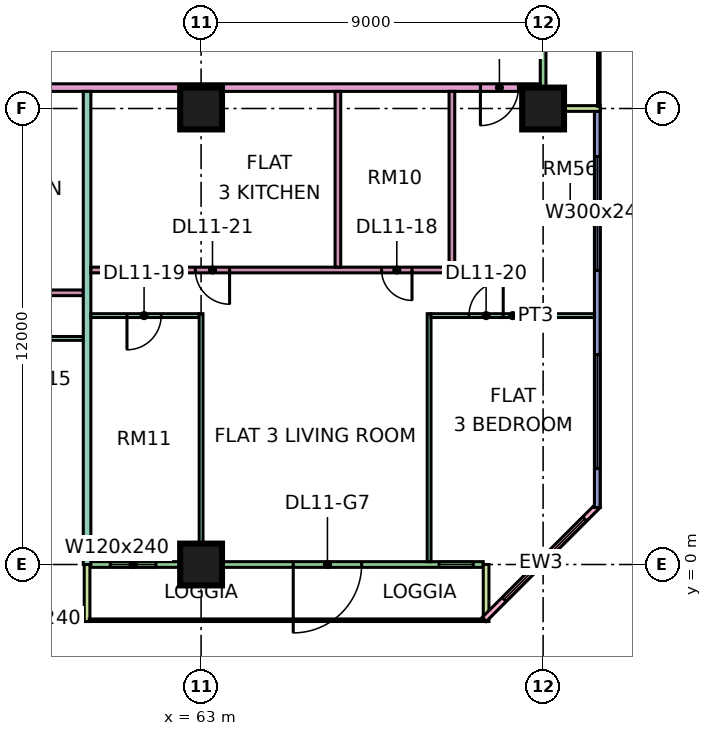
"""IFC4 building model, lengths in metres.
Left out: names, types, materials, properties, quantities, classifications, styles, units other than length and angle.
Written with IfcOpenShell. Run it as: python <this file> out.ifc"""

import sys

from ifc_helpers import new_model, si_unit, direction, frame, frame_2d, origin, origin_2d, place, context, subcontext, project, spatial, rectangle, extrude, element, fill, save


model = new_model("IFC4")
c1 = context("Model", 3, precision=1e-05, world=origin(), true_north=direction((0.0, 1.0)))
c2 = subcontext(c1, "Body", "Model", "MODEL_VIEW")
j1 = project(units=[si_unit("LENGTHUNIT", "METRE"), si_unit("PLANEANGLEUNIT", "RADIAN")], contexts=[c1])
p1 = place(None, origin())
s1 = spatial("IfcSite", under=j1, at=p1, CompositionType="ELEMENT")
p2 = place(p1, origin())
s2 = spatial("IfcBuilding", under=s1, at=p2, CompositionType="ELEMENT")
p3 = place(p2, frame((0.0, 0.0, 56.4)))
s3 = spatial("IfcBuildingStorey", under=s2, at=p3, CompositionType="ELEMENT", Elevation=56.4)
for number, where, z_axis, x_axis in (
    (1, (63.0, 0.0, 0.0), (0.0, 0.0, 1.0), (1.0, 0.0, 0.0)),
    (2, (63.0, 12.0, 0.0), (0.0, 0.0, 1.0), (1.0, 0.0, 0.0)),
    (3, (72.0, 12.0, 0.0), (0.0, 0.0, 1.0), (1.0, 0.0, 0.0)),
):
    element("IfcColumn", number, at=place(p3, frame(where, z_axis=z_axis, x_axis=x_axis)), inside=s3, PredefinedType="COLUMN", context=c2, shape_type="SweptSolid", body=[
        extrude(rectangle(XDim=1.1, YDim=1.1, at=origin_2d()), origin(), (0.0, 0.0, 1.0), 3.75),
    ])
p4 = place(p3, frame((48.075, -1.425, 0.0), z_axis=(0.0, 0.0, 1.0), x_axis=(1.0, 0.0, 0.0)))
e4 = element("IfcWall", 4, at=p4, inside=s3, PredefinedType="SOLIDWALL", context=c2, shape_type="SweptSolid", body=[
    extrude(rectangle(XDim=11.85, YDim=0.15, at=frame_2d((5.925, 0.0))), origin(), (0.0, 0.0, 1.0), 3.35),
])
p5 = place(p4, frame((0.562, 0.0, 0.45)))
e5 = element("IfcOpeningElement", 5, at=p5, cuts=e4, PredefinedType="OPENING", context=c2, shape_type="SweptSolid", body=[
    extrude(rectangle(XDim=1.8, YDim=2.4, at=frame_2d((0.9, 1.2))), frame((0.0, 0.085, 0.0), z_axis=(0.0, -1.0, 0.0), x_axis=(1.0, 0.0, 0.0)), (0.0, 0.0, 1.0), 0.17),
])
p6 = place(p4, frame((3.525, 0.0, 0.45)))
e6 = element("IfcOpeningElement", 6, at=p6, cuts=e4, PredefinedType="OPENING", context=c2, shape_type="SweptSolid", body=[
    extrude(rectangle(XDim=4.8, YDim=2.4, at=frame_2d((2.4, 1.2))), frame((0.0, 0.085, 0.0), z_axis=(0.0, -1.0, 0.0), x_axis=(1.0, 0.0, 0.0)), (0.0, 0.0, 1.0), 0.17),
])
p7 = place(p4, frame((9.488, 0.0, 0.45)))
e7 = element("IfcOpeningElement", 7, at=p7, cuts=e4, PredefinedType="OPENING", context=c2, shape_type="SweptSolid", body=[
    extrude(rectangle(XDim=1.8, YDim=2.4, at=frame_2d((0.9, 1.2))), frame((0.0, 0.085, 0.0), z_axis=(0.0, -1.0, 0.0), x_axis=(1.0, 0.0, 0.0)), (0.0, 0.0, 1.0), 0.17),
])
p8 = place(p3, frame((60.075, 0.0, 0.0), z_axis=(0.0, 0.0, 1.0), x_axis=(1.0, 0.0, 0.0)))
e8 = element("IfcWall", 8, at=p8, inside=s3, PredefinedType="SOLIDWALL", context=c2, shape_type="SweptSolid", body=[
    extrude(rectangle(XDim=10.35, YDim=0.15, at=frame_2d((5.175, 0.0))), origin(), (0.0, 0.0, 1.0), 3.35),
])
p9 = place(p8, frame((0.538, 0.0, 0.45)))
e9 = element("IfcOpeningElement", 9, at=p9, cuts=e8, PredefinedType="OPENING", context=c2, shape_type="SweptSolid", body=[
    extrude(rectangle(XDim=1.2, YDim=2.4, at=frame_2d((0.6, 1.2))), frame((0.0, 0.085, 0.0), z_axis=(0.0, -1.0, 0.0), x_axis=(1.0, 0.0, 0.0)), (0.0, 0.0, 1.0), 0.17),
])
p10 = place(p8, frame((5.35, 0.0, 0.0)))
e10 = element("IfcOpeningElement", 10, at=p10, cuts=e8, PredefinedType="OPENING", context=c2, shape_type="SweptSolid", body=[
    extrude(rectangle(XDim=1.8, YDim=2.4, at=frame_2d((0.9, 1.2))), frame((0.0, 0.085, 0.0), z_axis=(0.0, -1.0, 0.0), x_axis=(1.0, 0.0, 0.0)), (0.0, 0.0, 1.0), 0.17),
])
p11 = place(p8, frame((9.188, 0.0, 0.45)))
e11 = element("IfcOpeningElement", 11, at=p11, cuts=e8, PredefinedType="OPENING", context=c2, shape_type="SweptSolid", body=[
    extrude(rectangle(XDim=0.9, YDim=2.4, at=frame_2d((0.45, 1.2))), frame((0.0, 0.085, 0.0), z_axis=(0.0, -1.0, 0.0), x_axis=(1.0, 0.0, 0.0)), (0.0, 0.0, 1.0), 0.17),
])
for number, where, z_axis, x_axis in (
    (12, (60.0, -1.5, 0.0), (0.0, 0.0, 1.0), (0.0, 1.0, 0.0)),
    (13, (70.5, -1.5, 0.0), (0.0, 0.0, 1.0), (0.0, 1.0, 0.0)),
):
    element("IfcWall", number, at=place(p3, frame(where, z_axis=z_axis, x_axis=x_axis)), inside=s3, PredefinedType="SOLIDWALL", context=c2, shape_type="SweptSolid", body=[
        extrude(rectangle(XDim=1.5, YDim=0.15, at=frame_2d((0.75, 0.0))), origin(), (0.0, 0.0, 1.0), 3.35),
    ])
p12 = place(p3, frame((70.447, -1.447, 0.0), z_axis=(0.0, 0.0, 1.0), x_axis=(0.707106781187, 0.707106781187, 0.0)))
e14 = element("IfcWall", 14, at=p12, inside=s3, PredefinedType="SOLIDWALL", context=c2, shape_type="SweptSolid", body=[
    extrude(rectangle(XDim=4.243, YDim=0.15, at=frame_2d((2.121, 0.0))), origin(), (0.0, 0.0, 1.0), 3.35),
])
p13 = place(p12, frame((0.744, 0.0, 0.45)))
e15 = element("IfcOpeningElement", 15, at=p13, cuts=e14, PredefinedType="OPENING", context=c2, shape_type="SweptSolid", body=[
    extrude(rectangle(XDim=3.0, YDim=2.4, at=frame_2d((1.5, 1.2))), frame((0.0, 0.085, 0.0), z_axis=(0.0, -1.0, 0.0), x_axis=(1.0, 0.0, 0.0)), (0.0, 0.0, 1.0), 0.17),
])
p14 = place(p3, frame((73.425, 1.5, 0.0), z_axis=(0.0, 0.0, 1.0), x_axis=(0.0, 1.0, 0.0)))
e16 = element("IfcWall", 16, at=p14, inside=s3, PredefinedType="SOLIDWALL", context=c2, shape_type="SweptSolid", body=[
    extrude(rectangle(XDim=10.425, YDim=0.15, at=frame_2d((5.212, 0.0))), origin(), (0.0, 0.0, 1.0), 3.35),
])
p15 = place(p14, frame((1.025, 0.0, 0.45)))
e17 = element("IfcOpeningElement", 17, at=p15, cuts=e16, PredefinedType="OPENING", context=c2, shape_type="SweptSolid", body=[
    extrude(rectangle(XDim=3.0, YDim=2.4, at=frame_2d((1.5, 1.2))), frame((0.0, 0.085, 0.0), z_axis=(0.0, -1.0, 0.0), x_axis=(1.0, 0.0, 0.0)), (0.0, 0.0, 1.0), 0.17),
])
p16 = place(p14, frame((6.238, 0.0, 0.45)))
e18 = element("IfcOpeningElement", 18, at=p16, cuts=e16, PredefinedType="OPENING", context=c2, shape_type="SweptSolid", body=[
    extrude(rectangle(XDim=3.0, YDim=2.4, at=frame_2d((1.5, 1.2))), frame((0.0, 0.085, 0.0), z_axis=(0.0, -1.0, 0.0), x_axis=(1.0, 0.0, 0.0)), (0.0, 0.0, 1.0), 0.17),
])
p17 = place(p3, frame((72.0, 12.075, 0.0), z_axis=(0.0, 0.0, 1.0), x_axis=(0.0, 1.0, 0.0)))
e19 = element("IfcWall", 19, at=p17, inside=s3, PredefinedType="SOLIDWALL", context=c2, shape_type="SweptSolid", body=[
    extrude(rectangle(XDim=10.35, YDim=0.15, at=frame_2d((5.175, 0.0))), origin(), (0.0, 0.0, 1.0), 3.35),
])
p18 = place(p17, frame((4.275, 0.0, 1.7)))
e20 = element("IfcOpeningElement", 20, at=p18, cuts=e19, PredefinedType="OPENING", context=c2, shape_type="SweptSolid", body=[
    extrude(rectangle(XDim=1.2, YDim=0.9, at=frame_2d((0.6, 0.45))), frame((0.0, 0.085, 0.0), z_axis=(0.0, -1.0, 0.0), x_axis=(1.0, 0.0, 0.0)), (0.0, 0.0, 1.0), 0.17),
])
p19 = place(p17, frame((7.988, 0.0, 0.45)))
e21 = element("IfcOpeningElement", 21, at=p19, cuts=e19, PredefinedType="OPENING", context=c2, shape_type="SweptSolid", body=[
    extrude(rectangle(XDim=1.8, YDim=2.4, at=frame_2d((0.9, 1.2))), frame((0.0, 0.085, 0.0), z_axis=(0.0, -1.0, 0.0), x_axis=(1.0, 0.0, 0.0)), (0.0, 0.0, 1.0), 0.17),
])
p20 = place(p3, frame((73.5, 12.0, 0.0), z_axis=(0.0, 0.0, 1.0), x_axis=(-1.0, 0.0, 0.0)))
e22 = element("IfcWall", 22, at=p20, inside=s3, PredefinedType="SOLIDWALL", context=c2, shape_type="SweptSolid", body=[
    extrude(rectangle(XDim=1.5, YDim=0.15, at=frame_2d((0.75, 0.0))), origin(), (0.0, 0.0, 1.0), 3.35),
])
p21 = place(p3, frame((40.65, 12.55, 0.0), z_axis=(0.0, 0.0, 1.0), x_axis=(1.0, 0.0, 0.0)))
e23 = element("IfcWall", 23, at=p21, inside=s3, PredefinedType="PARTITIONING", context=c2, shape_type="SweptSolid", body=[
    extrude(rectangle(XDim=31.276, YDim=0.2, at=frame_2d((15.638, 0.0))), origin(), (0.0, 0.0, 1.0), 3.35),
])
p22 = place(p21, frame((8.4, 0.0, 0.0)))
e24 = element("IfcOpeningElement", 24, at=p22, cuts=e23, PredefinedType="OPENING", context=c2, shape_type="SweptSolid", body=[
    extrude(rectangle(XDim=1.0, YDim=2.1, at=frame_2d((0.5, 1.05))), frame((0.0, 0.11, 0.0), z_axis=(0.0, -1.0, 0.0), x_axis=(1.0, 0.0, 0.0)), (0.0, 0.0, 1.0), 0.22),
])
p23 = place(p21, frame((29.7, 0.0, 0.0)))
e25 = element("IfcOpeningElement", 25, at=p23, cuts=e23, PredefinedType="OPENING", context=c2, shape_type="SweptSolid", body=[
    extrude(rectangle(XDim=1.0, YDim=2.1, at=frame_2d((0.5, 1.05))), frame((0.0, 0.11, 0.0), z_axis=(0.0, -1.0, 0.0), x_axis=(1.0, 0.0, 0.0)), (0.0, 0.0, 1.0), 0.22),
])
p24 = place(p21, frame((1.05, 0.0, 0.0)))
e26 = element("IfcOpeningElement", 26, at=p24, cuts=e23, PredefinedType="OPENING", context=c2, shape_type="SweptSolid", body=[
    extrude(rectangle(XDim=1.0, YDim=2.1, at=frame_2d((0.5, 1.05))), frame((0.0, 0.11, 0.0), z_axis=(0.0, -1.0, 0.0), x_axis=(1.0, 0.0, 0.0)), (0.0, 0.0, 1.0), 0.22),
])
p25 = place(p3, frame((50.925, 7.15, 0.0), z_axis=(0.0, 0.0, 1.0), x_axis=(1.0, 0.0, 0.0)))
e27 = element("IfcWall", 27, at=p25, inside=s3, PredefinedType="PARTITIONING", context=c2, shape_type="SweptSolid", body=[
    extrude(rectangle(XDim=8.975, YDim=0.15, at=frame_2d((4.487, 0.0))), origin(), (0.0, 0.0, 1.0), 3.35),
])
p26 = place(p25, frame((5.925, 0.0, 0.0)))
e28 = element("IfcOpeningElement", 28, at=p26, cuts=e27, PredefinedType="OPENING", context=c2, shape_type="SweptSolid", body=[
    extrude(rectangle(XDim=0.9, YDim=2.1, at=frame_2d((0.45, 1.05))), frame((0.0, 0.085, 0.0), z_axis=(0.0, -1.0, 0.0), x_axis=(1.0, 0.0, 0.0)), (0.0, 0.0, 1.0), 0.17),
])
p27 = place(p3, frame((57.05, 5.95, 0.0), z_axis=(0.0, 0.0, 1.0), x_axis=(1.0, 0.0, 0.0)))
e29 = element("IfcWall", 29, at=p27, inside=s3, PredefinedType="PARTITIONING", context=c2, shape_type="SweptSolid", body=[
    extrude(rectangle(XDim=2.85, YDim=0.1, at=frame_2d((1.425, 0.0))), origin(), (0.0, 0.0, 1.0), 3.35),
])
p28 = place(p27, frame((1.0, 0.0, 0.0)))
e30 = element("IfcOpeningElement", 30, at=p28, cuts=e29, PredefinedType="OPENING", context=c2, shape_type="SweptSolid", body=[
    extrude(rectangle(XDim=0.9, YDim=2.1, at=frame_2d((0.45, 1.05))), frame((0.0, 0.06, 0.0), z_axis=(0.0, -1.0, 0.0), x_axis=(1.0, 0.0, 0.0)), (0.0, 0.0, 1.0), 0.12),
])
p29 = place(p3, frame((60.0, 0.0, 0.0), z_axis=(0.0, 0.0, 1.0), x_axis=(0.0, 1.0, 0.0)))
e31 = element("IfcWall", 31, at=p29, inside=s3, PredefinedType="PARTITIONING", context=c2, shape_type="SweptSolid", body=[
    extrude(rectangle(XDim=12.45, YDim=0.2, at=frame_2d((6.225, 0.0))), origin(), (0.0, 0.0, 1.0), 3.35),
])
p30 = place(p3, frame((60.1, 6.55, 0.0), z_axis=(0.0, 0.0, 1.0), x_axis=(1.0, 0.0, 0.0)))
e32 = element("IfcWall", 32, at=p30, inside=s3, PredefinedType="PARTITIONING", context=c2, shape_type="SweptSolid", body=[
    extrude(rectangle(XDim=2.85, YDim=0.1, at=frame_2d((1.425, 0.0))), origin(), (0.0, 0.0, 1.0), 3.35),
])
p31 = place(p30, frame((0.95, 0.0, 0.0)))
e33 = element("IfcOpeningElement", 33, at=p31, cuts=e32, PredefinedType="OPENING", context=c2, shape_type="SweptSolid", body=[
    extrude(rectangle(XDim=0.9, YDim=2.1, at=frame_2d((0.45, 1.05))), frame((0.0, 0.06, 0.0), z_axis=(0.0, -1.0, 0.0), x_axis=(1.0, 0.0, 0.0)), (0.0, 0.0, 1.0), 0.12),
])
p32 = place(p3, frame((60.1, 7.75, 0.0), z_axis=(0.0, 0.0, 1.0), x_axis=(1.0, 0.0, 0.0)))
e34 = element("IfcWall", 34, at=p32, inside=s3, PredefinedType="PARTITIONING", context=c2, shape_type="SweptSolid", body=[
    extrude(rectangle(XDim=9.575, YDim=0.15, at=frame_2d((4.788, 0.0))), origin(), (0.0, 0.0, 1.0), 3.35),
])
p33 = place(p32, frame((7.65, 0.0, 0.0)))
e35 = element("IfcOpeningElement", 35, at=p33, cuts=e34, PredefinedType="OPENING", context=c2, shape_type="SweptSolid", body=[
    extrude(rectangle(XDim=0.8, YDim=2.1, at=frame_2d((0.4, 1.05))), frame((0.0, 0.085, 0.0), z_axis=(0.0, -1.0, 0.0), x_axis=(1.0, 0.0, 0.0)), (0.0, 0.0, 1.0), 0.17),
])
p34 = place(p32, frame((2.75, 0.0, 0.0)))
e36 = element("IfcOpeningElement", 36, at=p34, cuts=e34, PredefinedType="OPENING", context=c2, shape_type="SweptSolid", body=[
    extrude(rectangle(XDim=0.9, YDim=2.1, at=frame_2d((0.45, 1.05))), frame((0.0, 0.085, 0.0), z_axis=(0.0, -1.0, 0.0), x_axis=(1.0, 0.0, 0.0)), (0.0, 0.0, 1.0), 0.17),
])
p35 = place(p3, frame((63.0, 0.074, 0.0), z_axis=(0.0, 0.0, 1.0), x_axis=(0.0, 1.0, 0.0)))
e37 = element("IfcWall", 37, at=p35, inside=s3, PredefinedType="PARTITIONING", context=c2, shape_type="SweptSolid", body=[
    extrude(rectangle(XDim=6.526, YDim=0.1, at=frame_2d((3.263, 0.0))), origin(), (0.0, 0.0, 1.0), 3.35),
])
p36 = place(p3, frame((66.6, 7.825, 0.0), z_axis=(0.0, 0.0, 1.0), x_axis=(0.0, 1.0, 0.0)))
e38 = element("IfcWall", 38, at=p36, inside=s3, PredefinedType="PARTITIONING", context=c2, shape_type="SweptSolid", body=[
    extrude(rectangle(XDim=4.625, YDim=0.15, at=frame_2d((2.312, 0.0))), origin(), (0.0, 0.0, 1.0), 3.35),
])
p37 = place(p3, frame((69.0, 0.074, 0.0), z_axis=(0.0, 0.0, 1.0), x_axis=(0.0, 1.0, 0.0)))
e39 = element("IfcWall", 39, at=p37, inside=s3, PredefinedType="PARTITIONING", context=c2, shape_type="SweptSolid", body=[
    extrude(rectangle(XDim=6.526, YDim=0.1, at=frame_2d((3.263, 0.0))), origin(), (0.0, 0.0, 1.0), 3.35),
])
p38 = place(p3, frame((69.05, 6.55, 0.0), z_axis=(0.0, 0.0, 1.0), x_axis=(1.0, 0.0, 0.0)))
e40 = element("IfcWall", 40, at=p38, inside=s3, PredefinedType="PARTITIONING", context=c2, shape_type="SweptSolid", body=[
    extrude(rectangle(XDim=4.3, YDim=0.1, at=frame_2d((2.15, 0.0))), origin(), (0.0, 0.0, 1.0), 3.35),
])
p39 = place(p38, frame((1.0, 0.0, 0.0)))
e41 = element("IfcOpeningElement", 41, at=p39, cuts=e40, PredefinedType="OPENING", context=c2, shape_type="SweptSolid", body=[
    extrude(rectangle(XDim=0.9, YDim=2.1, at=frame_2d((0.45, 1.05))), frame((0.0, 0.06, 0.0), z_axis=(0.0, -1.0, 0.0), x_axis=(1.0, 0.0, 0.0)), (0.0, 0.0, 1.0), 0.12),
])
p40 = place(p3, frame((69.6, 7.825, 0.0), z_axis=(0.0, 0.0, 1.0), x_axis=(0.0, 1.0, 0.0)))
e42 = element("IfcWall", 42, at=p40, inside=s3, PredefinedType="PARTITIONING", context=c2, shape_type="SweptSolid", body=[
    extrude(rectangle(XDim=4.625, YDim=0.15, at=frame_2d((2.312, 0.0))), origin(), (0.0, 0.0, 1.0), 3.35),
])
p41 = place(p7, origin())
e43 = element("IfcWindow", 43, at=p41, inside=s3, PartitioningType="SINGLE_PANEL", PredefinedType="WINDOW", context=c2, shape_type="SweptSolid", body=[
    extrude(rectangle(XDim=1.8, YDim=2.4, at=frame_2d((0.9, 1.2))), frame((0.0, 0.03, 0.0), z_axis=(0.0, -1.0, 0.0), x_axis=(1.0, 0.0, 0.0)), (0.0, 0.0, 1.0), 0.06),
])
fill(e7, e43)
p42 = place(p9, origin())
e44 = element("IfcWindow", 44, at=p42, inside=s3, PartitioningType="SINGLE_PANEL", PredefinedType="WINDOW", context=c2, shape_type="SweptSolid", body=[
    extrude(rectangle(XDim=1.2, YDim=2.4, at=frame_2d((0.6, 1.2))), frame((0.0, 0.03, 0.0), z_axis=(0.0, -1.0, 0.0), x_axis=(1.0, 0.0, 0.0)), (0.0, 0.0, 1.0), 0.06),
])
fill(e9, e44)
p43 = place(p10, frame((1.8, 0.0, 0.0), z_axis=(0.0, 0.0, 1.0), x_axis=(-1.0, 0.0, 0.0)))
e45 = element("IfcDoor", 45, at=p43, inside=s3, OperationType="DOUBLE_DOOR_SINGLE_SWING", PredefinedType="DOOR", context=c2, shape_type="SweptSolid", body=[
    extrude(rectangle(XDim=1.8, YDim=2.4, at=frame_2d((0.9, 1.2))), frame((0.0, 0.025, 0.0), z_axis=(0.0, -1.0, 0.0), x_axis=(1.0, 0.0, 0.0)), (0.0, 0.0, 1.0), 0.05),
])
fill(e10, e45)
p44 = place(p11, origin())
e46 = element("IfcWindow", 46, at=p44, inside=s3, PartitioningType="SINGLE_PANEL", PredefinedType="WINDOW", context=c2, shape_type="SweptSolid", body=[
    extrude(rectangle(XDim=0.9, YDim=2.4, at=frame_2d((0.45, 1.2))), frame((0.0, 0.03, 0.0), z_axis=(0.0, -1.0, 0.0), x_axis=(1.0, 0.0, 0.0)), (0.0, 0.0, 1.0), 0.06),
])
fill(e11, e46)
p45 = place(p13, origin())
e47 = element("IfcWindow", 47, at=p45, inside=s3, PartitioningType="SINGLE_PANEL", PredefinedType="WINDOW", context=c2, shape_type="SweptSolid", body=[
    extrude(rectangle(XDim=3.0, YDim=2.4, at=frame_2d((1.5, 1.2))), frame((0.0, 0.03, 0.0), z_axis=(0.0, -1.0, 0.0), x_axis=(1.0, 0.0, 0.0)), (0.0, 0.0, 1.0), 0.06),
])
fill(e15, e47)
p46 = place(p15, origin())
e48 = element("IfcWindow", 48, at=p46, inside=s3, PartitioningType="SINGLE_PANEL", PredefinedType="WINDOW", context=c2, shape_type="SweptSolid", body=[
    extrude(rectangle(XDim=3.0, YDim=2.4, at=frame_2d((1.5, 1.2))), frame((0.0, 0.03, 0.0), z_axis=(0.0, -1.0, 0.0), x_axis=(1.0, 0.0, 0.0)), (0.0, 0.0, 1.0), 0.06),
])
fill(e17, e48)
p47 = place(p16, origin())
e49 = element("IfcWindow", 49, at=p47, inside=s3, PartitioningType="SINGLE_PANEL", PredefinedType="WINDOW", context=c2, shape_type="SweptSolid", body=[
    extrude(rectangle(XDim=3.0, YDim=2.4, at=frame_2d((1.5, 1.2))), frame((0.0, 0.03, 0.0), z_axis=(0.0, -1.0, 0.0), x_axis=(1.0, 0.0, 0.0)), (0.0, 0.0, 1.0), 0.06),
])
fill(e18, e49)
p48 = place(p33, origin())
e50 = element("IfcDoor", 50, at=p48, inside=s3, OperationType="SINGLE_SWING_RIGHT", PredefinedType="DOOR", context=c2, shape_type="SweptSolid", body=[
    extrude(rectangle(XDim=0.8, YDim=2.1, at=frame_2d((0.4, 1.05))), frame((0.0, 0.025, 0.0), z_axis=(0.0, -1.0, 0.0), x_axis=(1.0, 0.0, 0.0)), (0.0, 0.0, 1.0), 0.05),
])
fill(e35, e50)
p49 = place(p31, frame((0.9, 0.0, 0.0), z_axis=(0.0, 0.0, 1.0), x_axis=(-1.0, 0.0, 0.0)))
e51 = element("IfcDoor", 51, at=p49, inside=s3, OperationType="SINGLE_SWING_LEFT", PredefinedType="DOOR", context=c2, shape_type="SweptSolid", body=[
    extrude(rectangle(XDim=0.9, YDim=2.1, at=frame_2d((0.45, 1.05))), frame((0.0, 0.025, 0.0), z_axis=(0.0, -1.0, 0.0), x_axis=(1.0, 0.0, 0.0)), (0.0, 0.0, 1.0), 0.05),
])
fill(e33, e51)
p50 = place(p39, frame((0.9, 0.0, 0.0), z_axis=(0.0, 0.0, 1.0), x_axis=(-1.0, 0.0, 0.0)))
e52 = element("IfcDoor", 52, at=p50, inside=s3, OperationType="SINGLE_SWING_RIGHT", PredefinedType="DOOR", context=c2, shape_type="SweptSolid", body=[
    extrude(rectangle(XDim=0.9, YDim=2.1, at=frame_2d((0.45, 1.05))), frame((0.0, 0.025, 0.0), z_axis=(0.0, -1.0, 0.0), x_axis=(1.0, 0.0, 0.0)), (0.0, 0.0, 1.0), 0.05),
])
fill(e41, e52)
p51 = place(p34, origin())
e53 = element("IfcDoor", 53, at=p51, inside=s3, OperationType="SINGLE_SWING_RIGHT", PredefinedType="DOOR", context=c2, shape_type="SweptSolid", body=[
    extrude(rectangle(XDim=0.9, YDim=2.1, at=frame_2d((0.45, 1.05))), frame((0.0, 0.025, 0.0), z_axis=(0.0, -1.0, 0.0), x_axis=(1.0, 0.0, 0.0)), (0.0, 0.0, 1.0), 0.05),
])
fill(e36, e53)
p52 = place(p23, frame((1.0, 0.0, 0.0), z_axis=(0.0, 0.0, 1.0), x_axis=(-1.0, 0.0, 0.0)))
e54 = element("IfcDoor", 54, at=p52, inside=s3, OperationType="SINGLE_SWING_LEFT", PredefinedType="DOOR", context=c2, shape_type="SweptSolid", body=[
    extrude(rectangle(XDim=1.0, YDim=2.1, at=frame_2d((0.5, 1.05))), frame((0.0, 0.025, 0.0), z_axis=(0.0, -1.0, 0.0), x_axis=(1.0, 0.0, 0.0)), (0.0, 0.0, 1.0), 0.05),
])
fill(e25, e54)
save(model, sys.argv[1])
